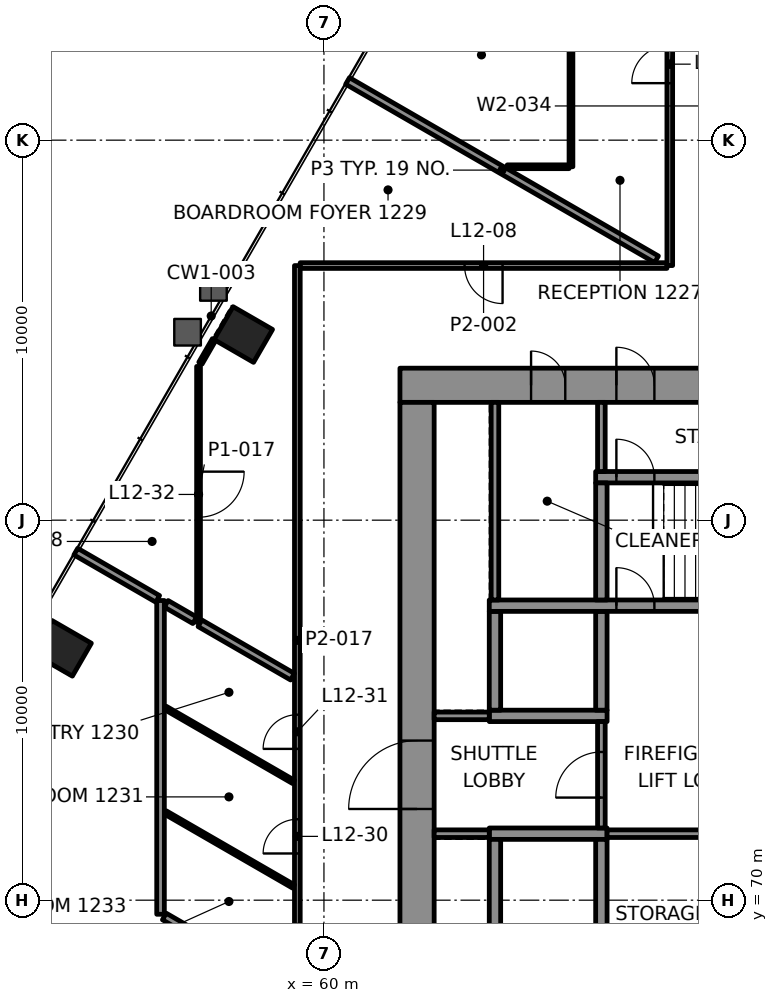
"""IFC4 building model, lengths in metres.
Left out: names, types, materials, properties, quantities, classifications, styles, units other than length and angle.
Written with IfcOpenShell. Run it as: python <this file> out.ifc"""

import sys

from ifc_helpers import new_model, si_unit, direction, frame, frame_2d, origin, origin_2d, place, context, subcontext, project, spatial, rectangle, extrude, element, fill, save


model = new_model("IFC4")
c1 = context("Model", 3, precision=1e-05, world=origin(), true_north=direction((0.0, 1.0)))
c2 = subcontext(c1, "Body", "Model", "MODEL_VIEW")
j1 = project(units=[si_unit("LENGTHUNIT", "METRE"), si_unit("PLANEANGLEUNIT", "RADIAN")], contexts=[c1])
p1 = place(None, origin())
s1 = spatial("IfcSite", under=j1, at=p1, CompositionType="ELEMENT")
p2 = place(p1, origin())
s2 = spatial("IfcBuilding", under=s1, at=p2, CompositionType="ELEMENT")
p3 = place(p2, frame((0.0, 0.0, 56.8)))
s3 = spatial("IfcBuildingStorey", under=s2, at=p3, CompositionType="ELEMENT", Elevation=56.8)
for number, where, z_axis, x_axis in (
    (1, (57.878, 84.885, -0.0), (0.0, 0.0, 1.0), (-0.5, -0.866, 0.0)),
    (2, (53.111, 76.628, -0.0), (0.0, 0.0, 1.0), (-0.5, -0.866, 0.0)),
):
    element("IfcColumn", number, at=place(p3, frame(where, z_axis=z_axis, x_axis=x_axis)), inside=s3, PredefinedType="COLUMN", context=c2, shape_type="SweptSolid", body=[
        extrude(rectangle(XDim=1.0, YDim=1.2, at=origin_2d()), origin(), (0.0, 0.0, 1.0), 4.2),
    ])
p4 = place(p3, frame((62.0, 83.55, 0.0), z_axis=(0.0, 0.0, 1.0), x_axis=(1.0, 0.0, 0.0)))
e3 = element("IfcWall", 3, at=p4, inside=s3, PredefinedType="SHEAR", context=c2, shape_type="SweptSolid", body=[
    extrude(rectangle(XDim=26.0, YDim=0.9, at=frame_2d((13.0, 0.0))), origin(), (0.0, 0.0, 1.0), 4.0),
])
p5 = place(p4, frame((5.695, 0.0, 0.0)))
e4 = element("IfcOpeningElement", 4, at=p5, cuts=e3, PredefinedType="OPENING", context=c2, shape_type="SweptSolid", body=[
    extrude(rectangle(XDim=1.0, YDim=2.1, at=frame_2d((0.5, 1.05))), frame((0.0, 0.46, 0.0), z_axis=(0.0, -1.0, 0.0), x_axis=(1.0, 0.0, 0.0)), (0.0, 0.0, 1.0), 0.92),
])
p6 = place(p4, frame((19.505, 0.0, 0.0)))
e5 = element("IfcOpeningElement", 5, at=p6, cuts=e3, PredefinedType="OPENING", context=c2, shape_type="SweptSolid", body=[
    extrude(rectangle(XDim=1.0, YDim=2.1, at=frame_2d((0.5, 1.05))), frame((0.0, 0.46, 0.0), z_axis=(0.0, -1.0, 0.0), x_axis=(1.0, 0.0, 0.0)), (0.0, 0.0, 1.0), 0.92),
])
p7 = place(p4, frame((3.45, 0.0, 0.0)))
e6 = element("IfcOpeningElement", 6, at=p7, cuts=e3, PredefinedType="OPENING", context=c2, shape_type="SweptSolid", body=[
    extrude(rectangle(XDim=0.9, YDim=2.1, at=frame_2d((0.45, 1.05))), frame((0.0, 0.46, 0.0), z_axis=(0.0, -1.0, 0.0), x_axis=(1.0, 0.0, 0.0)), (0.0, 0.0, 1.0), 0.92),
])
p8 = place(p4, frame((12.65, 0.0, 0.0)))
e7 = element("IfcOpeningElement", 7, at=p8, cuts=e3, PredefinedType="OPENING", context=c2, shape_type="SweptSolid", body=[
    extrude(rectangle(XDim=0.9, YDim=2.1, at=frame_2d((0.45, 1.05))), frame((0.0, 0.46, 0.0), z_axis=(0.0, -1.0, 0.0), x_axis=(1.0, 0.0, 0.0)), (0.0, 0.0, 1.0), 0.92),
])
p9 = place(p4, frame((22.55, 0.0, 0.0)))
e8 = element("IfcOpeningElement", 8, at=p9, cuts=e3, PredefinedType="OPENING", context=c2, shape_type="SweptSolid", body=[
    extrude(rectangle(XDim=0.9, YDim=2.1, at=frame_2d((0.45, 1.05))), frame((0.0, 0.46, 0.0), z_axis=(0.0, -1.0, 0.0), x_axis=(1.0, 0.0, 0.0)), (0.0, 0.0, 1.0), 0.92),
])
p10 = place(p3, frame((62.45, 66.9, 0.0), z_axis=(0.0, 0.0, 1.0), x_axis=(0.0, 1.0, 0.0)))
e9 = element("IfcWall", 9, at=p10, inside=s3, PredefinedType="SHEAR", context=c2, shape_type="SweptSolid", body=[
    extrude(rectangle(XDim=16.2, YDim=0.9, at=frame_2d((8.1, 0.0))), origin(), (0.0, 0.0, 1.0), 4.0),
])
p11 = place(p10, frame((5.5, 0.0, 0.0)))
e10 = element("IfcOpeningElement", 10, at=p11, cuts=e9, PredefinedType="OPENING", context=c2, shape_type="SweptSolid", body=[
    extrude(rectangle(XDim=1.8, YDim=2.1, at=frame_2d((0.9, 1.05))), frame((0.0, 0.46, 0.0), z_axis=(0.0, -1.0, 0.0), x_axis=(1.0, 0.0, 0.0)), (0.0, 0.0, 1.0), 0.92),
])
for number, where, z_axis, x_axis in (
    (11, (64.35, 71.75, 0.0), (0.0, 0.0, 1.0), (1.0, 0.0, 0.0)),
    (12, (64.35, 74.85, 0.0), (0.0, 0.0, 1.0), (1.0, 0.0, 0.0)),
):
    element("IfcWall", number, at=place(p3, frame(where, z_axis=z_axis, x_axis=x_axis)), inside=s3, PredefinedType="SHEAR", context=c2, shape_type="SweptSolid", body=[
        extrude(rectangle(XDim=3.1, YDim=0.3, at=frame_2d((1.55, 0.0))), origin(), (0.0, 0.0, 1.0), 4.0),
    ])
for number, where, z_axis, x_axis in (
    (13, (64.5, 69.0, 0.0), (0.0, 0.0, 1.0), (0.0, 1.0, 0.0)),
    (14, (64.5, 75.0, 0.0), (0.0, 0.0, 1.0), (0.0, 1.0, 0.0)),
    (15, (67.3, 69.0, 0.0), (0.0, 0.0, 1.0), (0.0, 1.0, 0.0)),
    (16, (67.3, 75.0, 0.0), (0.0, 0.0, 1.0), (0.0, 1.0, 0.0)),
):
    element("IfcWall", number, at=place(p3, frame(where, z_axis=z_axis, x_axis=x_axis)), inside=s3, PredefinedType="SHEAR", context=c2, shape_type="SweptSolid", body=[
        extrude(rectangle(XDim=2.6, YDim=0.3, at=frame_2d((1.3, 0.0))), origin(), (0.0, 0.0, 1.0), 4.0),
    ])
p12 = place(p3, frame((64.35, 77.75, 0.0), z_axis=(0.0, 0.0, 1.0), x_axis=(1.0, 0.0, 0.0)))
e17 = element("IfcWall", 17, at=p12, inside=s3, PredefinedType="SHEAR", context=c2, shape_type="SweptSolid", body=[
    extrude(rectangle(XDim=22.75, YDim=0.3, at=frame_2d((11.375, 0.0))), origin(), (0.0, 0.0, 1.0), 4.0),
])
p13 = place(p12, frame((3.345, 0.0, 0.0)))
e18 = element("IfcOpeningElement", 18, at=p13, cuts=e17, PredefinedType="OPENING", context=c2, shape_type="SweptSolid", body=[
    extrude(rectangle(XDim=1.0, YDim=2.1, at=frame_2d((0.5, 1.05))), frame((0.0, 0.16, 0.0), z_axis=(0.0, -1.0, 0.0), x_axis=(1.0, 0.0, 0.0)), (0.0, 0.0, 1.0), 0.32),
])
p14 = place(p3, frame((67.15, 81.13, 0.0), z_axis=(0.0, 0.0, 1.0), x_axis=(1.0, 0.0, 0.0)))
e19 = element("IfcWall", 19, at=p14, inside=s3, PredefinedType="SHEAR", context=c2, shape_type="SweptSolid", body=[
    extrude(rectangle(XDim=6.91, YDim=0.3, at=frame_2d((3.455, 0.0))), origin(), (0.0, 0.0, 1.0), 4.0),
])
p15 = place(p14, frame((0.545, 0.0, 0.0)))
e20 = element("IfcOpeningElement", 20, at=p15, cuts=e19, PredefinedType="OPENING", context=c2, shape_type="SweptSolid", body=[
    extrude(rectangle(XDim=1.0, YDim=2.1, at=frame_2d((0.5, 1.05))), frame((0.0, 0.16, 0.0), z_axis=(0.0, -1.0, 0.0), x_axis=(1.0, 0.0, 0.0)), (0.0, 0.0, 1.0), 0.32),
])
p16 = place(p3, frame((67.3, 77.9, 0.0), z_axis=(0.0, 0.0, 1.0), x_axis=(0.0, 1.0, 0.0)))
e21 = element("IfcWall", 21, at=p16, inside=s3, PredefinedType="SHEAR", context=c2, shape_type="SweptSolid", body=[
    extrude(rectangle(XDim=3.08, YDim=0.3, at=frame_2d((1.54, 0.0))), origin(), (0.0, 0.0, 1.0), 4.0),
])
p17 = place(p3, frame((69.025, 86.7, 0.0), z_axis=(0.0, 0.0, 1.0), x_axis=(-1.0, 0.0, 0.0)))
e22 = element("IfcWall", 22, at=p17, inside=s3, PredefinedType="PARTITIONING", context=c2, shape_type="SweptSolid", body=[
    extrude(rectangle(XDim=9.649, YDim=0.15, at=frame_2d((4.825, 0.0))), origin(), (0.0, 0.0, 1.0), 3.4),
])
p18 = place(p17, frame((4.325, 0.0, 0.0)))
e23 = element("IfcOpeningElement", 23, at=p18, cuts=e22, PredefinedType="OPENING", context=c2, shape_type="SweptSolid", body=[
    extrude(rectangle(XDim=1.0, YDim=2.1, at=frame_2d((0.5, 1.05))), frame((0.0, 0.085, 0.0), z_axis=(0.0, -1.0, 0.0), x_axis=(1.0, 0.0, 0.0)), (0.0, 0.0, 1.0), 0.17),
])
p19 = place(p3, frame((64.823, 89.3, 0.0), z_axis=(0.0, 0.0, 1.0), x_axis=(1.0, 0.0, 0.0)))
e24 = element("IfcWall", 24, at=p19, inside=s3, PredefinedType="PARTITIONING", context=c2, shape_type="SweptSolid", body=[
    extrude(rectangle(XDim=1.627, YDim=0.1, at=frame_2d((0.813, 0.0))), origin(), (0.0, 0.0, 1.0), 3.4),
])
p20 = place(p3, frame((56.75, 84.132, 0.0), z_axis=(0.0, 0.0, 1.0), x_axis=(0.49987987985, 0.866094744079, 0.0)))
e25 = element("IfcWall", 25, at=p20, inside=s3, PredefinedType="PARTITIONING", context=c2, shape_type="SweptSolid", body=[
    extrude(rectangle(XDim=0.716, YDim=0.1, at=frame_2d((0.358, 0.0))), origin(), (0.0, 0.0, 1.0), 3.4),
])
p21 = place(p3, frame((69.1, 86.7, 0.0), z_axis=(0.0, 0.0, 1.0), x_axis=(0.0, 1.0, 0.0)))
e26 = element("IfcWall", 26, at=p21, inside=s3, PredefinedType="PARTITIONING", context=c2, shape_type="SweptSolid", body=[
    extrude(rectangle(XDim=10.6, YDim=0.15, at=frame_2d((5.3, 0.0))), origin(), (0.0, 0.0, 1.0), 3.4),
])
p22 = place(p21, frame((4.8, 0.0, 0.0)))
e27 = element("IfcOpeningElement", 27, at=p22, cuts=e26, PredefinedType="OPENING", context=c2, shape_type="SweptSolid", body=[
    extrude(rectangle(XDim=1.0, YDim=2.1, at=frame_2d((0.5, 1.05))), frame((0.0, 0.085, 0.0), z_axis=(0.0, -1.0, 0.0), x_axis=(1.0, 0.0, 0.0)), (0.0, 0.0, 1.0), 0.17),
])
p23 = place(p3, frame((66.5, 99.899, 0.0), z_axis=(0.0, 0.0, 1.0), x_axis=(0.0, -1.0, 0.0)))
e28 = element("IfcWall", 28, at=p23, inside=s3, PredefinedType="PARTITIONING", context=c2, shape_type="SweptSolid", body=[
    extrude(rectangle(XDim=10.599, YDim=0.1, at=frame_2d((5.3, 0.0))), origin(), (0.0, 0.0, 1.0), 3.165),
])
p24 = place(p23, frame((5.062, 0.0, 0.0)))
e29 = element("IfcOpeningElement", 29, at=p24, cuts=e28, PredefinedType="OPENING", context=c2, shape_type="SweptSolid", body=[
    extrude(rectangle(XDim=1.0, YDim=2.1, at=frame_2d((0.5, 1.05))), frame((0.0, 0.06, 0.0), z_axis=(0.0, -1.0, 0.0), x_axis=(1.0, 0.0, 0.0)), (0.0, 0.0, 1.0), 0.12),
])
p25 = place(p3, frame((59.3, 66.975, 0.0), z_axis=(0.0, 0.0, 1.0), x_axis=(0.0, 1.0, 0.0)))
e30 = element("IfcWall", 30, at=p25, inside=s3, PredefinedType="PARTITIONING", context=c2, shape_type="SweptSolid", body=[
    extrude(rectangle(XDim=19.725, YDim=0.15, at=frame_2d((9.862, 0.0))), origin(), (0.0, 0.0, 1.0), 3.4),
])
p26 = place(p25, frame((1.502, 0.0, 0.0)))
e31 = element("IfcOpeningElement", 31, at=p26, cuts=e30, PredefinedType="OPENING", context=c2, shape_type="SweptSolid", body=[
    extrude(rectangle(XDim=0.9, YDim=2.1, at=frame_2d((0.45, 1.05))), frame((0.0, 0.085, 0.0), z_axis=(0.0, -1.0, 0.0), x_axis=(1.0, 0.0, 0.0)), (0.0, 0.0, 1.0), 0.17),
])
p27 = place(p25, frame((4.254, 0.0, 0.0)))
e32 = element("IfcOpeningElement", 32, at=p27, cuts=e30, PredefinedType="OPENING", context=c2, shape_type="SweptSolid", body=[
    extrude(rectangle(XDim=0.9, YDim=2.1, at=frame_2d((0.45, 1.05))), frame((0.0, 0.085, 0.0), z_axis=(0.0, -1.0, 0.0), x_axis=(1.0, 0.0, 0.0)), (0.0, 0.0, 1.0), 0.17),
])
p28 = place(p25, frame((7.007, 0.0, 0.0)))
e33 = element("IfcOpeningElement", 33, at=p28, cuts=e30, PredefinedType="OPENING", context=c2, shape_type="SweptSolid", body=[
    extrude(rectangle(XDim=0.9, YDim=2.1, at=frame_2d((0.45, 1.05))), frame((0.0, 0.085, 0.0), z_axis=(0.0, -1.0, 0.0), x_axis=(1.0, 0.0, 0.0)), (0.0, 0.0, 1.0), 0.17),
])
p29 = place(p3, frame((56.7, 84.046, 0.0), z_axis=(0.0, 0.0, 1.0), x_axis=(0.0, -1.0, 0.0)))
e34 = element("IfcWall", 34, at=p29, inside=s3, PredefinedType="PARTITIONING", context=c2, shape_type="SweptSolid", body=[
    extrude(rectangle(XDim=6.737, YDim=0.1, at=frame_2d((3.369, 0.0))), origin(), (0.0, 0.0, 1.0), 3.165),
])
p30 = place(p29, frame((2.769, 0.0, 0.0)))
e35 = element("IfcOpeningElement", 35, at=p30, cuts=e34, PredefinedType="OPENING", context=c2, shape_type="SweptSolid", body=[
    extrude(rectangle(XDim=1.2, YDim=2.1, at=frame_2d((0.6, 1.05))), frame((0.0, 0.06, 0.0), z_axis=(0.0, -1.0, 0.0), x_axis=(1.0, 0.0, 0.0)), (0.0, 0.0, 1.0), 0.12),
])
p31 = place(p3, frame((55.7, 69.63, 0.0), z_axis=(0.0, 0.0, 1.0), x_axis=(0.0, 1.0, 0.0)))
e36 = element("IfcWall", 36, at=p31, inside=s3, PredefinedType="PARTITIONING", context=c2, shape_type="SweptSolid", body=[
    extrude(rectangle(XDim=8.256, YDim=0.2, at=frame_2d((4.128, 0.0))), origin(), (0.0, 0.0, 1.0), 3.4),
])
p32 = place(p3, frame((68.751, 86.865, 0.0), z_axis=(0.0, 0.0, 1.0), x_axis=(-0.8660257632, 0.499999377474, 0.0)))
e37 = element("IfcWall", 37, at=p32, inside=s3, PredefinedType="PARTITIONING", context=c2, shape_type="SweptSolid", body=[
    extrude(rectangle(XDim=9.387, YDim=0.2, at=frame_2d((4.693, 0.0))), origin(), (0.0, 0.0, 1.0), 3.165),
])
p33 = place(p3, frame((59.173, 75.881, 0.0), z_axis=(0.0, 0.0, 1.0), x_axis=(-0.866049697453, 0.499957919771, 0.0)))
e38 = element("IfcWall", 38, at=p33, inside=s3, PredefinedType="PARTITIONING", context=c2, shape_type="SweptSolid", body=[
    extrude(rectangle(XDim=2.812, YDim=0.2, at=frame_2d((1.406, 0.0))), origin(), (0.0, 0.0, 1.0), 3.4),
])
p34 = place(p3, frame((59.199, 73.113, 0.0), z_axis=(0.0, 0.0, 1.0), x_axis=(-0.866016482536, 0.500015451737, 0.0)))
e39 = element("IfcWall", 39, at=p34, inside=s3, PredefinedType="PARTITIONING", context=c2, shape_type="SweptSolid", body=[
    extrude(rectangle(XDim=3.895, YDim=0.1, at=frame_2d((1.948, 0.0))), origin(), (0.0, 0.0, 1.0), 3.4),
])
p35 = place(p3, frame((59.199, 70.361, 0.0), z_axis=(0.0, 0.0, 1.0), x_axis=(-0.866043624834, 0.499968438888, 0.0)))
e40 = element("IfcWall", 40, at=p35, inside=s3, PredefinedType="PARTITIONING", context=c2, shape_type="SweptSolid", body=[
    extrude(rectangle(XDim=3.895, YDim=0.1, at=frame_2d((1.947, 0.0))), origin(), (0.0, 0.0, 1.0), 3.4),
])
p36 = place(p3, frame((59.173, 67.623, 0.0), z_axis=(0.0, 0.0, 1.0), x_axis=(-0.866000809756, 0.500042595688, 0.0)))
e41 = element("IfcWall", 41, at=p36, inside=s3, PredefinedType="PARTITIONING", context=c2, shape_type="SweptSolid", body=[
    extrude(rectangle(XDim=3.895, YDim=0.2, at=frame_2d((1.947, 0.0))), origin(), (0.0, 0.0, 1.0), 3.4),
])
p37 = place(p3, frame((56.6, 77.366, 0.0), z_axis=(0.0, 0.0, 1.0), x_axis=(-0.866101087359, 0.499868889286, 0.0)))
e42 = element("IfcWall", 42, at=p37, inside=s3, PredefinedType="PARTITIONING", context=c2, shape_type="SweptSolid", body=[
    extrude(rectangle(XDim=0.866, YDim=0.2, at=frame_2d((0.433, 0.0))), origin(), (0.0, 0.0, 1.0), 3.4),
])
p38 = place(p3, frame((55.625, 77.929, 0.0), z_axis=(0.0, 0.0, 1.0), x_axis=(-0.86602376425, 0.500002839747, 0.0)))
e43 = element("IfcWall", 43, at=p38, inside=s3, PredefinedType="PARTITIONING", context=c2, shape_type="SweptSolid", body=[
    extrude(rectangle(XDim=2.487, YDim=0.2, at=frame_2d((1.244, 0.0))), origin(), (0.0, 0.0, 1.0), 3.165),
])
p39 = place(p3, frame((62.9, 71.75, 0.0), z_axis=(0.0, 0.0, 1.0), x_axis=(1.0, 0.0, 0.0)))
e44 = element("IfcWall", 44, at=p39, inside=s3, PredefinedType="PARTITIONING", context=c2, shape_type="SweptSolid", body=[
    extrude(rectangle(XDim=1.45, YDim=0.2, at=frame_2d((0.725, 0.0))), origin(), (0.0, 0.0, 1.0), 4.0),
])
p40 = place(p3, frame((67.45, 71.75, 0.0), z_axis=(0.0, 0.0, 1.0), x_axis=(1.0, 0.0, 0.0)))
e45 = element("IfcWall", 45, at=p40, inside=s3, PredefinedType="PARTITIONING", context=c2, shape_type="SweptSolid", body=[
    extrude(rectangle(XDim=2.85, YDim=0.2, at=frame_2d((1.425, 0.0))), origin(), (0.0, 0.0, 1.0), 4.0),
])
p41 = place(p3, frame((62.9, 74.85, 0.0), z_axis=(0.0, 0.0, 1.0), x_axis=(1.0, 0.0, 0.0)))
e46 = element("IfcWall", 46, at=p41, inside=s3, PredefinedType="PARTITIONING", context=c2, shape_type="SweptSolid", body=[
    extrude(rectangle(XDim=1.45, YDim=0.2, at=frame_2d((0.725, 0.0))), origin(), (0.0, 0.0, 1.0), 4.0),
])
p42 = place(p3, frame((64.5, 77.9, 0.0), z_axis=(0.0, 0.0, 1.0), x_axis=(0.0, 1.0, 0.0)))
e47 = element("IfcWall", 47, at=p42, inside=s3, PredefinedType="PARTITIONING", context=c2, shape_type="SweptSolid", body=[
    extrude(rectangle(XDim=5.2, YDim=0.2, at=frame_2d((2.6, 0.0))), origin(), (0.0, 0.0, 1.0), 4.0),
])
p43 = place(p3, frame((67.3, 71.9, 0.0), z_axis=(0.0, 0.0, 1.0), x_axis=(0.0, 1.0, 0.0)))
e48 = element("IfcWall", 48, at=p43, inside=s3, PredefinedType="PARTITIONING", context=c2, shape_type="SweptSolid", body=[
    extrude(rectangle(XDim=2.8, YDim=0.2, at=frame_2d((1.4, 0.0))), origin(), (0.0, 0.0, 1.0), 4.0),
])
p44 = place(p43, frame((0.8, 0.0, 0.0)))
e49 = element("IfcOpeningElement", 49, at=p44, cuts=e48, PredefinedType="OPENING", context=c2, shape_type="SweptSolid", body=[
    extrude(rectangle(XDim=1.2, YDim=2.1, at=frame_2d((0.6, 1.05))), frame((0.0, 0.11, 0.0), z_axis=(0.0, -1.0, 0.0), x_axis=(1.0, 0.0, 0.0)), (0.0, 0.0, 1.0), 0.22),
])
p45 = place(p3, frame((67.3, 81.28, 0.0), z_axis=(0.0, 0.0, 1.0), x_axis=(0.0, 1.0, 0.0)))
e50 = element("IfcWall", 50, at=p45, inside=s3, PredefinedType="PARTITIONING", context=c2, shape_type="SweptSolid", body=[
    extrude(rectangle(XDim=1.82, YDim=0.2, at=frame_2d((0.91, 0.0))), origin(), (0.0, 0.0, 1.0), 4.0),
])
p46 = place(p18, origin())
e51 = element("IfcDoor", 51, at=p46, inside=s3, OperationType="SINGLE_SWING_LEFT", PredefinedType="DOOR", context=c2, shape_type="SweptSolid", body=[
    extrude(rectangle(XDim=1.0, YDim=2.1, at=frame_2d((0.5, 1.05))), frame((0.0, 0.025, 0.0), z_axis=(0.0, -1.0, 0.0), x_axis=(1.0, 0.0, 0.0)), (0.0, 0.0, 1.0), 0.05),
])
fill(e23, e51)
p47 = place(p22, origin())
e52 = element("IfcDoor", 52, at=p47, inside=s3, OperationType="SINGLE_SWING_RIGHT", PredefinedType="DOOR", context=c2, shape_type="SweptSolid", body=[
    extrude(rectangle(XDim=1.0, YDim=2.1, at=frame_2d((0.5, 1.05))), frame((0.0, 0.025, 0.0), z_axis=(0.0, -1.0, 0.0), x_axis=(1.0, 0.0, 0.0)), (0.0, 0.0, 1.0), 0.05),
])
fill(e27, e52)
p48 = place(p27, origin())
e53 = element("IfcDoor", 53, at=p48, inside=s3, OperationType="SINGLE_SWING_RIGHT", PredefinedType="DOOR", context=c2, shape_type="SweptSolid", body=[
    extrude(rectangle(XDim=0.9, YDim=2.1, at=frame_2d((0.45, 1.05))), frame((0.0, 0.025, 0.0), z_axis=(0.0, -1.0, 0.0), x_axis=(1.0, 0.0, 0.0)), (0.0, 0.0, 1.0), 0.05),
])
fill(e32, e53)
p49 = place(p28, origin())
e54 = element("IfcDoor", 54, at=p49, inside=s3, OperationType="SINGLE_SWING_LEFT", PredefinedType="DOOR", context=c2, shape_type="SweptSolid", body=[
    extrude(rectangle(XDim=0.9, YDim=2.1, at=frame_2d((0.45, 1.05))), frame((0.0, 0.025, 0.0), z_axis=(0.0, -1.0, 0.0), x_axis=(1.0, 0.0, 0.0)), (0.0, 0.0, 1.0), 0.05),
])
fill(e33, e54)
p50 = place(p30, origin())
e55 = element("IfcDoor", 55, at=p50, inside=s3, OperationType="DOUBLE_DOOR_SINGLE_SWING", PredefinedType="DOOR", context=c2, shape_type="SweptSolid", body=[
    extrude(rectangle(XDim=1.2, YDim=2.1, at=frame_2d((0.6, 1.05))), frame((0.0, 0.025, 0.0), z_axis=(0.0, -1.0, 0.0), x_axis=(1.0, 0.0, 0.0)), (0.0, 0.0, 1.0), 0.05),
])
fill(e35, e55)
p51 = place(p13, origin())
e56 = element("IfcDoor", 56, at=p51, inside=s3, OperationType="SINGLE_SWING_LEFT", PredefinedType="DOOR", context=c2, shape_type="SweptSolid", body=[
    extrude(rectangle(XDim=1.0, YDim=2.1, at=frame_2d((0.5, 1.05))), frame((0.0, 0.025, 0.0), z_axis=(0.0, -1.0, 0.0), x_axis=(1.0, 0.0, 0.0)), (0.0, 0.0, 1.0), 0.05),
])
fill(e18, e56)
p52 = place(p15, origin())
e57 = element("IfcDoor", 57, at=p52, inside=s3, OperationType="SINGLE_SWING_RIGHT", PredefinedType="DOOR", context=c2, shape_type="SweptSolid", body=[
    extrude(rectangle(XDim=1.0, YDim=2.1, at=frame_2d((0.5, 1.05))), frame((0.0, 0.025, 0.0), z_axis=(0.0, -1.0, 0.0), x_axis=(1.0, 0.0, 0.0)), (0.0, 0.0, 1.0), 0.05),
])
fill(e20, e57)
p53 = place(p5, origin())
e58 = element("IfcDoor", 58, at=p53, inside=s3, OperationType="SINGLE_SWING_LEFT", PredefinedType="DOOR", context=c2, shape_type="SweptSolid", body=[
    extrude(rectangle(XDim=1.0, YDim=2.1, at=frame_2d((0.5, 1.05))), frame((0.0, 0.17, 0.0), z_axis=(0.0, -1.0, 0.0), x_axis=(1.0, 0.0, 0.0)), (0.0, 0.0, 1.0), 0.34),
])
fill(e4, e58)
p54 = place(p44, origin())
e59 = element("IfcDoor", 59, at=p54, inside=s3, OperationType="SINGLE_SWING_RIGHT", PredefinedType="DOOR", context=c2, shape_type="SweptSolid", body=[
    extrude(rectangle(XDim=1.2, YDim=2.1, at=frame_2d((0.6, 1.05))), frame((0.0, 0.025, 0.0), z_axis=(0.0, -1.0, 0.0), x_axis=(1.0, 0.0, 0.0)), (0.0, 0.0, 1.0), 0.05),
])
fill(e49, e59)
p55 = place(p11, origin())
e60 = element("IfcDoor", 60, at=p55, inside=s3, OperationType="SINGLE_SWING_LEFT", PredefinedType="DOOR", context=c2, shape_type="SweptSolid", body=[
    extrude(rectangle(XDim=1.8, YDim=2.1, at=frame_2d((0.9, 1.05))), frame((0.0, 0.17, 0.0), z_axis=(0.0, -1.0, 0.0), x_axis=(1.0, 0.0, 0.0)), (0.0, 0.0, 1.0), 0.34),
])
fill(e10, e60)
p56 = place(p7, origin())
e61 = element("IfcDoor", 61, at=p56, inside=s3, OperationType="SINGLE_SWING_RIGHT", PredefinedType="DOOR", context=c2, shape_type="SweptSolid", body=[
    extrude(rectangle(XDim=0.9, YDim=2.1, at=frame_2d((0.45, 1.05))), frame((0.0, 0.17, 0.0), z_axis=(0.0, -1.0, 0.0), x_axis=(1.0, 0.0, 0.0)), (0.0, 0.0, 1.0), 0.34),
])
fill(e6, e61)
save(model, sys.argv[1])
